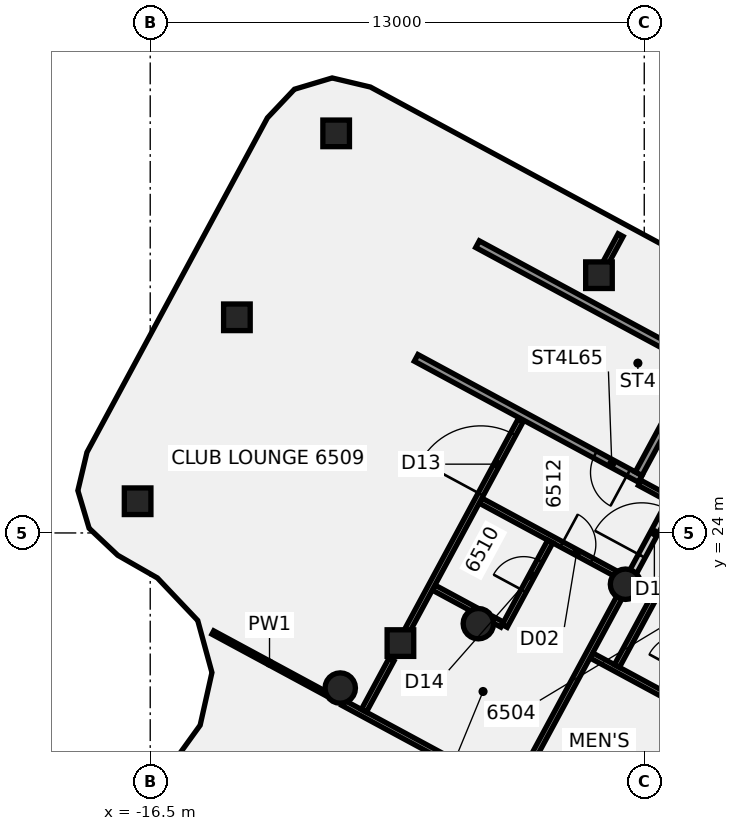
"""IFC4 building model, lengths in metres.
Left out: names, types, materials, properties, quantities, classifications, styles, units other than length and angle.
Written with IfcOpenShell. Run it as: python <this file> out.ifc"""

import sys

from ifc_helpers import new_model, si_unit, direction, frame, frame_2d, origin, origin_2d, place, context, subcontext, project, spatial, polyline, rectangle, circle, outline, extrude, element, fill, save


model = new_model("IFC4")
c1 = context("Model", 3, precision=1e-05, world=origin(), true_north=direction((0.0, 1.0)))
c2 = subcontext(c1, "Body", "Model", "MODEL_VIEW")
j1 = project(units=[si_unit("LENGTHUNIT", "METRE"), si_unit("PLANEANGLEUNIT", "RADIAN")], contexts=[c1])
p1 = place(None, origin())
s1 = spatial("IfcSite", under=j1, at=p1, CompositionType="ELEMENT")
p2 = place(p1, origin())
s2 = spatial("IfcBuilding", under=s1, at=p2, CompositionType="ELEMENT")
p3 = place(p2, frame((0.0, 0.0, 256.8)))
s3 = spatial("IfcBuildingStorey", under=s2, at=p3, CompositionType="ELEMENT", Elevation=256.8)
for number, where, z_axis, x_axis in (
    (1, (-3.994, 22.651, -0.14), (0.0, 0.0, 1.0), (1.0, 0.0, 0.0)),
    (2, (-7.866, 21.613, -0.14), (0.0, 0.0, 1.0), (1.0, 0.0, 0.0)),
    (3, (-11.5, 19.919, -0.14), (0.0, 0.0, 1.0), (1.0, 0.0, 0.0)),
):
    element("IfcColumn", number, at=place(p3, frame(where, z_axis=z_axis, x_axis=x_axis)), inside=s3, PredefinedType="COLUMN", context=c2, shape_type="SweptSolid", body=[
        extrude(circle(Radius=0.4, at=origin_2d()), origin(), (0.0, 0.0, 1.0), 3.6),
    ])
for number, where, z_axis, x_axis in (
    (4, (-9.916, 21.102, -0.136), (0.005, -0.05, 0.999), (0.476, 0.879, 0.042)),
    (5, (-4.692, 30.782, -0.136), (-0.044, -0.024, 0.999), (0.879, -0.475, 0.027)),
):
    element("IfcColumn", number, at=place(p3, frame(where, z_axis=z_axis, x_axis=x_axis)), inside=s3, PredefinedType="COLUMN", context=c2, shape_type="SweptSolid", body=[
        extrude(rectangle(XDim=0.7, YDim=0.7, at=origin_2d()), origin(), (0.0, 0.0, 1.0), 3.6),
    ])
p4 = place(p3, frame((-11.607, 34.514, -0.134), z_axis=(0.029049931535, -0.106268703033, 0.993913006371), x_axis=(0.47628166474, 0.875672745452, 0.079705826044)))
e6 = element("IfcColumn", 6, at=p4, inside=s3, PredefinedType="COLUMN", context=c2, shape_type="SweptSolid", body=[
    extrude(rectangle(XDim=0.7, YDim=0.7, at=origin_2d()), origin(), (0.0, 0.0, 1.0), 3.614),
])
p5 = place(p3, frame((-14.219, 29.674, -0.135), z_axis=(0.053423491411, -0.118906005473, 0.991467242236), x_axis=(0.477084877161, 0.87527549275, 0.079264315901)))
e7 = element("IfcColumn", 7, at=p5, inside=s3, PredefinedType="COLUMN", context=c2, shape_type="SweptSolid", body=[
    extrude(rectangle(XDim=0.7, YDim=0.7, at=origin_2d()), origin(), (0.0, 0.0, 1.0), 3.624),
])
p6 = place(p3, frame((-16.832, 24.834, -0.136), z_axis=(0.077602513547, -0.131373805374, 0.988290834296), x_axis=(0.477990353093, 0.874827041619, 0.078758298619)))
e8 = element("IfcColumn", 8, at=p6, inside=s3, PredefinedType="COLUMN", context=c2, shape_type="SweptSolid", body=[
    extrude(rectangle(XDim=0.7, YDim=0.7, at=origin_2d()), origin(), (0.0, 0.0, 1.0), 3.637),
])
p7 = place(p3, frame((-14.852, 21.379, 0.0), z_axis=(0.0, 0.0, 1.0), x_axis=(0.880026474936, -0.47492462919, 0.0)))
e9 = element("IfcWall", 9, at=p7, inside=s3, PredefinedType="PARTITIONING", context=c2, shape_type="SweptSolid", body=[
    extrude(rectangle(XDim=3.388, YDim=0.1, at=frame_2d((1.694, 0.0))), origin(), (0.0, 0.0, 1.0), 2.864),
])
p8 = place(p3, frame((-11.424, 19.529, 0.0), z_axis=(0.0, 0.0, 1.0), x_axis=(0.880009979756, -0.474955193181, 0.0)))
e10 = element("IfcWall", 10, at=p8, inside=s3, PredefinedType="PARTITIONING", context=c2, shape_type="SweptSolid", body=[
    extrude(rectangle(XDim=15.808, YDim=0.15, at=frame_2d((7.904, 0.0))), origin(), (0.0, 0.0, 1.0), 2.864),
])
p9 = place(p8, frame((8.829, 0.0, 0.0)))
e11 = element("IfcOpeningElement", 11, at=p9, cuts=e10, PredefinedType="OPENING", context=c2, shape_type="SweptSolid", body=[
    extrude(rectangle(XDim=1.8, YDim=2.1, at=frame_2d((0.9, 1.05))), frame((0.0, 0.085, 0.0), z_axis=(0.0, -1.0, 0.0), x_axis=(1.0, 0.0, 0.0)), (0.0, 0.0, 1.0), 0.17),
])
p10 = place(p3, frame((-9.043, 22.562, 0.0), z_axis=(0.0, 0.0, 1.0), x_axis=(0.879935954221, -0.475092324153, 0.0)))
e12 = element("IfcWall", 12, at=p10, inside=s3, PredefinedType="PARTITIONING", context=c2, shape_type="SweptSolid", body=[
    extrude(rectangle(XDim=1.202, YDim=0.15, at=frame_2d((0.601, 0.0))), origin(), (0.0, 0.0, 1.0), 2.864),
])
p11 = place(p3, frame((-7.486, 21.722, 0.0), z_axis=(0.0, 0.0, 1.0), x_axis=(0.880051073949, -0.474879044854, 0.0)))
e13 = element("IfcWall", 13, at=p11, inside=s3, PredefinedType="PARTITIONING", context=c2, shape_type="SweptSolid", body=[
    extrude(rectangle(XDim=0.28, YDim=0.15, at=frame_2d((0.14, 0.0))), origin(), (0.0, 0.0, 1.0), 2.864),
])
p12 = place(p3, frame((-7.808, 24.85, 0.0), z_axis=(0.0, 0.0, 1.0), x_axis=(0.879989576418, -0.474992995101, 0.0)))
e14 = element("IfcWall", 14, at=p12, inside=s3, PredefinedType="PARTITIONING", context=c2, shape_type="SweptSolid", body=[
    extrude(rectangle(XDim=4.025, YDim=0.15, at=frame_2d((2.013, 0.0))), origin(), (0.0, 0.0, 1.0), 2.864),
])
p13 = place(p12, frame((2.425, 0.0, 0.0)))
e15 = element("IfcOpeningElement", 15, at=p13, cuts=e14, PredefinedType="OPENING", context=c2, shape_type="SweptSolid", body=[
    extrude(rectangle(XDim=0.9, YDim=2.1, at=frame_2d((0.45, 1.05))), frame((0.0, 0.085, 0.0), z_axis=(0.0, -1.0, 0.0), x_axis=(1.0, 0.0, 0.0)), (0.0, 0.0, 1.0), 0.17),
])
p14 = place(p3, frame((-4.893, 20.777, 0.0), z_axis=(0.0, 0.0, 1.0), x_axis=(0.880007149788, -0.474960436586, 0.0)))
e16 = element("IfcWall", 16, at=p14, inside=s3, PredefinedType="PARTITIONING", context=c2, shape_type="SweptSolid", body=[
    extrude(rectangle(XDim=3.45, YDim=0.15, at=frame_2d((1.725, 0.0))), origin(), (0.0, 0.0, 1.0), 2.864),
])
p15 = place(p3, frame((-3.619, 25.317, 0.0), z_axis=(0.0, 0.0, 1.0), x_axis=(0.879960000932, -0.475047783659, 0.0)))
e17 = element("IfcWall", 17, at=p15, inside=s3, PredefinedType="PARTITIONING", context=c2, shape_type="SweptSolid", body=[
    extrude(rectangle(XDim=0.86, YDim=0.15, at=frame_2d((0.43, 0.0))), origin(), (0.0, 0.0, 1.0), 2.864),
])
p16 = place(p3, frame((-10.876, 19.324, 0.0), z_axis=(0.0, 0.0, 1.0), x_axis=(0.474948327348, 0.880013685319, 0.0)))
e18 = element("IfcWall", 18, at=p16, inside=s3, PredefinedType="PARTITIONING", context=c2, shape_type="SweptSolid", body=[
    extrude(rectangle(XDim=1.527, YDim=0.15, at=frame_2d((0.763, 0.0))), origin(), (0.0, 0.0, 1.0), 2.864),
])
p17 = place(p3, frame((-9.755, 21.401, 0.0), z_axis=(0.0, 0.0, 1.0), x_axis=(0.47500714936, 0.87998193621, 0.0)))
e19 = element("IfcWall", 19, at=p17, inside=s3, PredefinedType="PARTITIONING", context=c2, shape_type="SweptSolid", body=[
    extrude(rectangle(XDim=6.32, YDim=0.15, at=frame_2d((3.16, 0.0))), origin(), (0.0, 0.0, 1.0), 2.864),
])
p18 = place(p17, frame((4.11, 0.0, 0.0)))
e20 = element("IfcOpeningElement", 20, at=p18, cuts=e19, PredefinedType="OPENING", context=c2, shape_type="SweptSolid", body=[
    extrude(rectangle(XDim=1.8, YDim=2.1, at=frame_2d((0.9, 1.05))), frame((0.0, 0.085, 0.0), z_axis=(0.0, -1.0, 0.0), x_axis=(1.0, 0.0, 0.0)), (0.0, 0.0, 1.0), 0.17),
])
p19 = place(p3, frame((-4.529, 31.083, 0.0), z_axis=(0.0, 0.0, 1.0), x_axis=(0.474932601123, 0.88002217267, 0.0)))
e21 = element("IfcWall", 21, at=p19, inside=s3, PredefinedType="PARTITIONING", context=c2, shape_type="SweptSolid", body=[
    extrude(rectangle(XDim=0.856, YDim=0.15, at=frame_2d((0.428, 0.0))), origin(), (0.0, 0.0, 1.0), 2.864),
])
p20 = place(p3, frame((-7.173, 21.553, 0.0), z_axis=(0.0, 0.0, 1.0), x_axis=(0.475033626328, 0.879967643642, 0.0)))
e22 = element("IfcWall", 22, at=p20, inside=s3, PredefinedType="PARTITIONING", context=c2, shape_type="SweptSolid", body=[
    extrude(rectangle(XDim=2.525, YDim=0.15, at=frame_2d((1.262, 0.0))), origin(), (0.0, 0.0, 1.0), 2.864),
])
p21 = place(p20, frame((1.05, 0.0, 0.0)))
e23 = element("IfcOpeningElement", 23, at=p21, cuts=e22, PredefinedType="OPENING", context=c2, shape_type="SweptSolid", body=[
    extrude(rectangle(XDim=0.9, YDim=2.1, at=frame_2d((0.45, 1.05))), frame((0.0, 0.085, 0.0), z_axis=(0.0, -1.0, 0.0), x_axis=(1.0, 0.0, 0.0)), (0.0, 0.0, 1.0), 0.17),
])
p22 = place(p3, frame((-6.918, 17.183, 0.0), z_axis=(0.0, 0.0, 1.0), x_axis=(0.475010414469, 0.879980173723, 0.0)))
e24 = element("IfcWall", 24, at=p22, inside=s3, PredefinedType="PARTITIONING", context=c2, shape_type="SweptSolid", body=[
    extrude(rectangle(XDim=5.978, YDim=0.15, at=frame_2d((2.989, 0.0))), origin(), (0.0, 0.0, 1.0), 2.864),
])
p23 = place(p3, frame((-3.865, 22.84, 0.0), z_axis=(0.0, 0.0, 1.0), x_axis=(0.474975497938, 0.879999020658, 0.0)))
e25 = element("IfcWall", 25, at=p23, inside=s3, PredefinedType="PARTITIONING", context=c2, shape_type="SweptSolid", body=[
    extrude(rectangle(XDim=7.696, YDim=0.2, at=frame_2d((3.848, 0.0))), origin(), (0.0, 0.0, 1.0), 2.864),
])
p24 = place(p23, frame((0.629, 0.0, 0.0)))
e26 = element("IfcOpeningElement", 26, at=p24, cuts=e25, PredefinedType="OPENING", context=c2, shape_type="SweptSolid", body=[
    extrude(rectangle(XDim=1.4, YDim=2.1, at=frame_2d((0.7, 1.05))), frame((0.0, 0.11, 0.0), z_axis=(0.0, -1.0, 0.0), x_axis=(1.0, 0.0, 0.0)), (0.0, 0.0, 1.0), 0.22),
])
p25 = place(p23, frame((5.247, 0.0, 0.0)))
e27 = element("IfcOpeningElement", 27, at=p25, cuts=e25, PredefinedType="OPENING", context=c2, shape_type="SweptSolid", body=[
    extrude(rectangle(XDim=0.9, YDim=2.1, at=frame_2d((0.45, 1.05))), frame((0.0, 0.11, 0.0), z_axis=(0.0, -1.0, 0.0), x_axis=(1.0, 0.0, 0.0)), (0.0, 0.0, 1.0), 0.22),
])
p26 = place(p3, frame((-4.219, 20.499, 0.0), z_axis=(0.0, 0.0, 1.0), x_axis=(0.47489329303, 0.880043385428, 0.0)))
e28 = element("IfcWall", 28, at=p26, inside=s3, PredefinedType="PARTITIONING", context=c2, shape_type="SweptSolid", body=[
    extrude(rectangle(XDim=2.825, YDim=0.15, at=frame_2d((1.413, 0.0))), origin(), (0.0, 0.0, 1.0), 2.864),
])
p27 = place(p3, frame((-3.75, 15.473, 0.0), z_axis=(0.0, 0.0, 1.0), x_axis=(0.474999530937, 0.879986048531, 0.0)))
e29 = element("IfcWall", 29, at=p27, inside=s3, PredefinedType="PARTITIONING", context=c2, shape_type="SweptSolid", body=[
    extrude(rectangle(XDim=4.125, YDim=0.15, at=frame_2d((2.062, 0.0))), origin(), (0.0, 0.0, 1.0), 2.864),
])
p28 = place(p27, frame((2.025, 0.0, 0.0)))
e30 = element("IfcOpeningElement", 30, at=p28, cuts=e29, PredefinedType="OPENING", context=c2, shape_type="SweptSolid", body=[
    extrude(rectangle(XDim=0.9, YDim=2.1, at=frame_2d((0.45, 1.05))), frame((0.0, 0.085, 0.0), z_axis=(0.0, -1.0, 0.0), x_axis=(1.0, 0.0, 0.0)), (0.0, 0.0, 1.0), 0.17),
])
p29 = place(p3, frame((-3.607, 25.424, -0.14), z_axis=(0.0, 0.0, 1.0), x_axis=(-0.879996788685, 0.474979633147, 0.0)))
e31 = element("IfcWall", 31, at=p29, inside=s3, PredefinedType="SHEAR", context=c2, shape_type="SweptSolid", body=[
    extrude(rectangle(XDim=6.7, YDim=0.2, at=frame_2d((3.35, 0.0))), origin(), (0.0, 0.0, 1.0), 3.154),
])
p30 = place(p29, frame((0.35, 0.0, 0.0)))
e32 = element("IfcOpeningElement", 32, at=p30, cuts=e31, PredefinedType="OPENING", context=c2, shape_type="SweptSolid", body=[
    extrude(rectangle(XDim=1.0, YDim=2.1, at=frame_2d((0.5, 1.05))), frame((0.0, 0.11, 0.0), z_axis=(0.0, -1.0, 0.0), x_axis=(1.0, 0.0, 0.0)), (0.0, 0.0, 1.0), 0.22),
])
p31 = place(p3, frame((-1.992, 28.416, -0.14), z_axis=(0.0, 0.0, 1.0), x_axis=(-0.879996788685, 0.474979633147, 0.0)))
e33 = element("IfcWall", 33, at=p31, inside=s3, PredefinedType="SHEAR", context=c2, shape_type="SweptSolid", body=[
    extrude(rectangle(XDim=6.7, YDim=0.2, at=frame_2d((3.35, 0.0))), origin(), (0.0, 0.0, 1.0), 3.154),
])
p32 = place(p3, frame((-2.127, 28.375, -0.14), z_axis=(0.0, 0.0, 1.0), x_axis=(-0.475009504157, -0.879980665106, 0.0)))
e34 = element("IfcWall", 34, at=p32, inside=s3, PredefinedType="SHEAR", context=c2, shape_type="SweptSolid", body=[
    extrude(rectangle(XDim=3.2, YDim=0.2, at=frame_2d((1.6, 0.0))), origin(), (0.0, 0.0, 1.0), 3.6),
])
p33 = place(p3, frame((0.0, 0.0, -0.14)))
e35 = element("IfcWall", 35, at=p33, inside=s3, PredefinedType="SHEAR", context=c2, shape_type="SweptSolid", body=[
    extrude(outline(polyline([(-7.759, 31.415), (-7.935, 31.51), (-9.455, 28.694), (-9.279, 28.599), (-7.759, 31.415)])), origin(), (0.0, 0.0, 1.0), 3.6),
])
p34 = place(p13, frame((0.9, 0.0, 0.0), z_axis=(0.0, 0.0, 1.0), x_axis=(-1.0, 0.0, 0.0)))
e36 = element("IfcDoor", 36, at=p34, inside=s3, OperationType="SINGLE_SWING_RIGHT", PredefinedType="DOOR", context=c2, shape_type="SweptSolid", body=[
    extrude(rectangle(XDim=0.9, YDim=2.1, at=frame_2d((0.45, 1.05))), frame((0.0, 0.025, 0.0), z_axis=(0.0, -1.0, 0.0), x_axis=(1.0, 0.0, 0.0)), (0.0, 0.0, 1.0), 0.05),
])
fill(e15, e36)
p35 = place(p18, origin())
e37 = element("IfcDoor", 37, at=p35, inside=s3, OperationType="DOUBLE_DOOR_SINGLE_SWING", PredefinedType="DOOR", context=c2, shape_type="SweptSolid", body=[
    extrude(rectangle(XDim=1.8, YDim=2.1, at=frame_2d((0.9, 1.05))), frame((0.0, 0.025, 0.0), z_axis=(0.0, -1.0, 0.0), x_axis=(1.0, 0.0, 0.0)), (0.0, 0.0, 1.0), 0.05),
])
fill(e20, e37)
p36 = place(p21, origin())
e38 = element("IfcDoor", 38, at=p36, inside=s3, OperationType="SINGLE_SWING_LEFT", PredefinedType="DOOR", context=c2, shape_type="SweptSolid", body=[
    extrude(rectangle(XDim=0.9, YDim=2.1, at=frame_2d((0.45, 1.05))), frame((0.0, 0.025, 0.0), z_axis=(0.0, -1.0, 0.0), x_axis=(1.0, 0.0, 0.0)), (0.0, 0.0, 1.0), 0.05),
])
fill(e23, e38)
p37 = place(p24, frame((1.4, 0.0, 0.0), z_axis=(0.0, 0.0, 1.0), x_axis=(-1.0, 0.0, 0.0)))
e39 = element("IfcDoor", 39, at=p37, inside=s3, OperationType="DOUBLE_DOOR_SINGLE_SWING", PredefinedType="DOOR", context=c2, shape_type="SweptSolid", body=[
    extrude(rectangle(XDim=1.4, YDim=2.1, at=frame_2d((0.7, 1.05))), frame((0.0, 0.025, 0.0), z_axis=(0.0, -1.0, 0.0), x_axis=(1.0, 0.0, 0.0)), (0.0, 0.0, 1.0), 0.05),
])
fill(e26, e39)
p38 = place(p30, origin())
e40 = element("IfcDoor", 40, at=p38, inside=s3, OperationType="SINGLE_SWING_LEFT", PredefinedType="DOOR", context=c2, shape_type="SweptSolid", body=[
    extrude(rectangle(XDim=1.0, YDim=2.1, at=frame_2d((0.5, 1.05))), frame((0.0, 0.025, 0.0), z_axis=(0.0, -1.0, 0.0), x_axis=(1.0, 0.0, 0.0)), (0.0, 0.0, 1.0), 0.05),
])
fill(e32, e40)
save(model, sys.argv[1])
